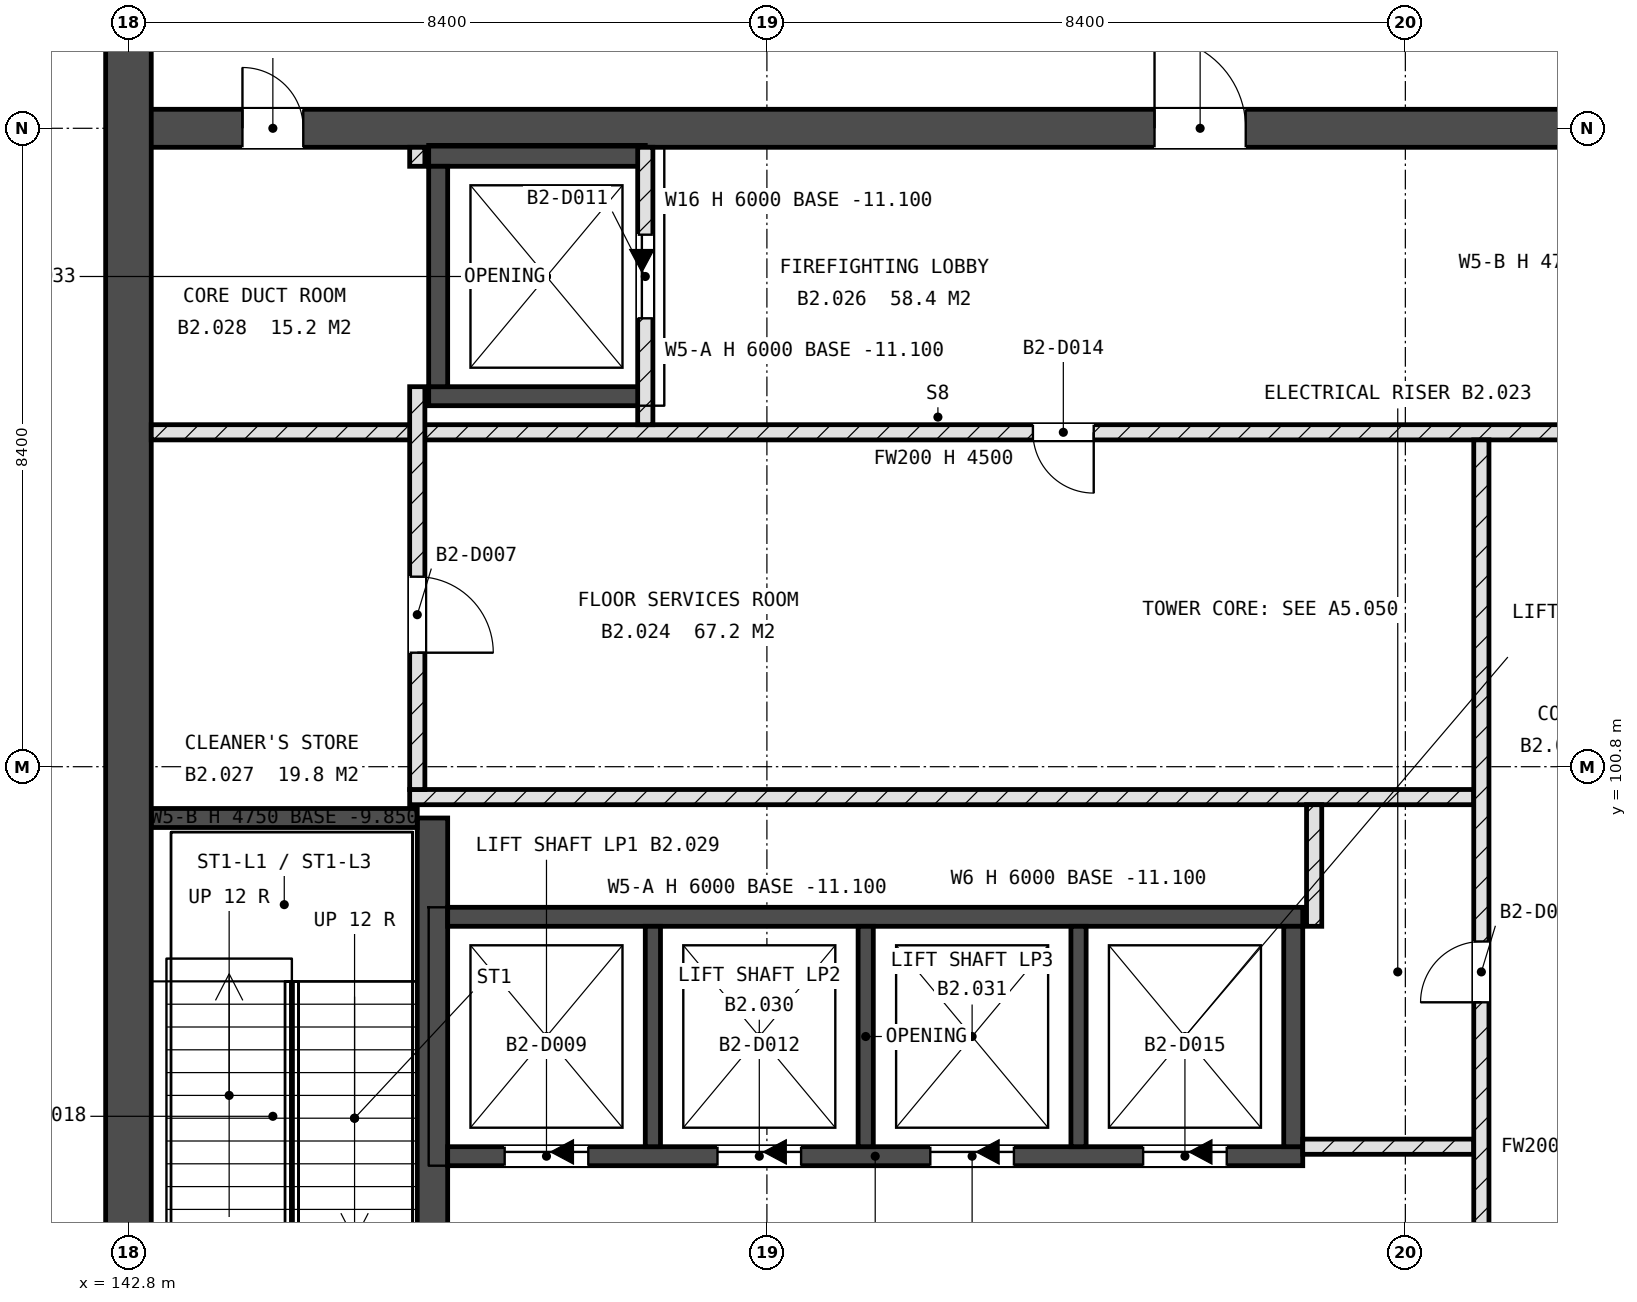
"""IFC4 building model, lengths in metres.
Left out: names, types, materials, properties, quantities, classifications, styles, units other than length and angle.
Written with IfcOpenShell. Run it as: python <this file> out.ifc"""

import sys

from ifc_helpers import new_model, si_unit, direction, frame, frame_2d, origin, place, context, subcontext, project, spatial, rectangle, extrude, element, fill, save


model = new_model("IFC4")
c1 = context("Model", 3, precision=1e-05, world=origin(), true_north=direction((0.0, 1.0)))
c2 = subcontext(c1, "Body", "Model", "MODEL_VIEW")
j1 = project(units=[si_unit("LENGTHUNIT", "METRE"), si_unit("PLANEANGLEUNIT", "RADIAN")], contexts=[c1])
p1 = place(None, origin())
s1 = spatial("IfcSite", under=j1, at=p1, CompositionType="ELEMENT")
p2 = place(p1, origin())
s2 = spatial("IfcBuilding", under=s1, at=p2, CompositionType="ELEMENT")
p3 = place(p2, frame((0.0, 0.0, -9.6)))
s3 = spatial("IfcBuildingStorey", under=s2, at=p3, CompositionType="ELEMENT", Elevation=-9.6)
p4 = place(p3, frame((142.8, 109.2, -0.25), z_axis=(0.0, 0.0, 1.0), x_axis=(1.0, 0.0, 0.0)))
e1 = element("IfcWall", 1, at=p4, inside=s3, PredefinedType="SHEAR", context=c2, shape_type="SweptSolid", body=[
    extrude(rectangle(XDim=25.2, YDim=0.5, at=frame_2d((12.6, 0.0))), origin(), (0.0, 0.0, 1.0), 4.75),
])
p5 = place(p4, frame((13.5, 0.0, 0.25)))
e2 = element("IfcOpeningElement", 2, at=p5, cuts=e1, PredefinedType="OPENING", context=c2, shape_type="SweptSolid", body=[
    extrude(rectangle(XDim=1.2, YDim=2.4, at=frame_2d((0.6, 1.2))), frame((0.0, 0.26, 0.0), z_axis=(0.0, -1.0, 0.0), x_axis=(1.0, 0.0, 0.0)), (0.0, 0.0, 1.0), 0.52),
])
p6 = place(p4, frame((1.5, 0.0, 0.25)))
e3 = element("IfcOpeningElement", 3, at=p6, cuts=e1, PredefinedType="OPENING", context=c2, shape_type="SweptSolid", body=[
    extrude(rectangle(XDim=0.8, YDim=2.1, at=frame_2d((0.4, 1.05))), frame((0.0, 0.26, 0.0), z_axis=(0.0, -1.0, 0.0), x_axis=(1.0, 0.0, 0.0)), (0.0, 0.0, 1.0), 0.52),
])
p7 = place(p3, frame((146.8, 92.65, -0.25), z_axis=(0.0, 0.0, 1.0), x_axis=(0.0, 1.0, 0.0)))
e4 = element("IfcWall", 4, at=p7, inside=s3, PredefinedType="SHEAR", context=c2, shape_type="SweptSolid", body=[
    extrude(rectangle(XDim=7.475, YDim=0.4, at=frame_2d((3.738, 0.0))), origin(), (0.0, 0.0, 1.0), 4.75),
])
p8 = place(p7, frame((0.1, 0.0, 0.25)))
e5 = element("IfcOpeningElement", 5, at=p8, cuts=e4, PredefinedType="OPENING", context=c2, shape_type="SweptSolid", body=[
    extrude(rectangle(XDim=1.0, YDim=2.1, at=frame_2d((0.5, 1.05))), frame((0.0, 0.21, 0.0), z_axis=(0.0, -1.0, 0.0), x_axis=(1.0, 0.0, 0.0)), (0.0, 0.0, 1.0), 0.42),
])
p9 = place(p3, frame((143.1, 100.125, -0.25), z_axis=(0.0, 0.0, 1.0), x_axis=(1.0, 0.0, 0.0)))
e6 = element("IfcWall", 6, at=p9, inside=s3, PredefinedType="SHEAR", context=c2, shape_type="SweptSolid", body=[
    extrude(rectangle(XDim=3.5, YDim=0.25, at=frame_2d((1.75, 0.0))), origin(), (0.0, 0.0, 1.0), 4.75),
])
p10 = place(p3, frame((147.0, 95.675, -1.5), z_axis=(0.0, 0.0, 1.0), x_axis=(1.0, 0.0, 0.0)))
e7 = element("IfcWall", 7, at=p10, inside=s3, PredefinedType="SHEAR", context=c2, shape_type="SweptSolid", body=[
    extrude(rectangle(XDim=11.25, YDim=0.25, at=frame_2d((5.625, 0.0))), origin(), (0.0, 0.0, 1.0), 6.0),
])
p11 = place(p10, frame((0.75, 0.0, 1.5)))
e8 = element("IfcOpeningElement", 8, at=p11, cuts=e7, PredefinedType="OPENING", context=c2, shape_type="SweptSolid", body=[
    extrude(rectangle(XDim=1.1, YDim=2.1, at=frame_2d((0.55, 1.05))), frame((0.0, 0.135, 0.0), z_axis=(0.0, -1.0, 0.0), x_axis=(1.0, 0.0, 0.0)), (0.0, 0.0, 1.0), 0.27),
])
p12 = place(p10, frame((3.55, 0.0, 1.5)))
e9 = element("IfcOpeningElement", 9, at=p12, cuts=e7, PredefinedType="OPENING", context=c2, shape_type="SweptSolid", body=[
    extrude(rectangle(XDim=1.1, YDim=2.1, at=frame_2d((0.55, 1.05))), frame((0.0, 0.135, 0.0), z_axis=(0.0, -1.0, 0.0), x_axis=(1.0, 0.0, 0.0)), (0.0, 0.0, 1.0), 0.27),
])
p13 = place(p10, frame((6.35, 0.0, 1.5)))
e10 = element("IfcOpeningElement", 10, at=p13, cuts=e7, PredefinedType="OPENING", context=c2, shape_type="SweptSolid", body=[
    extrude(rectangle(XDim=1.1, YDim=2.1, at=frame_2d((0.55, 1.05))), frame((0.0, 0.135, 0.0), z_axis=(0.0, -1.0, 0.0), x_axis=(1.0, 0.0, 0.0)), (0.0, 0.0, 1.0), 0.27),
])
p14 = place(p10, frame((9.15, 0.0, 1.5)))
e11 = element("IfcOpeningElement", 11, at=p14, cuts=e7, PredefinedType="OPENING", context=c2, shape_type="SweptSolid", body=[
    extrude(rectangle(XDim=1.1, YDim=2.1, at=frame_2d((0.55, 1.05))), frame((0.0, 0.135, 0.0), z_axis=(0.0, -1.0, 0.0), x_axis=(1.0, 0.0, 0.0)), (0.0, 0.0, 1.0), 0.27),
])
p15 = place(p3, frame((147.0, 98.825, -1.5), z_axis=(0.0, 0.0, 1.0), x_axis=(1.0, 0.0, 0.0)))
e12 = element("IfcWall", 12, at=p15, inside=s3, PredefinedType="SHEAR", context=c2, shape_type="SweptSolid", body=[
    extrude(rectangle(XDim=11.25, YDim=0.25, at=frame_2d((5.625, 0.0))), origin(), (0.0, 0.0, 1.0), 6.0),
])
p16 = place(p3, frame((158.125, 95.8, -1.5), z_axis=(0.0, 0.0, 1.0), x_axis=(0.0, 1.0, 0.0)))
e13 = element("IfcWall", 13, at=p16, inside=s3, PredefinedType="SHEAR", context=c2, shape_type="SweptSolid", body=[
    extrude(rectangle(XDim=2.9, YDim=0.25, at=frame_2d((1.45, 0.0))), origin(), (0.0, 0.0, 1.0), 6.0),
])
for number, where, z_axis, x_axis in (
    (14, (149.7, 95.8, -1.5), (0.0, 0.0, 1.0), (0.0, 1.0, 0.0)),
    (15, (152.5, 95.8, -1.5), (0.0, 0.0, 1.0), (0.0, 1.0, 0.0)),
    (16, (155.3, 95.8, -1.5), (0.0, 0.0, 1.0), (0.0, 1.0, 0.0)),
):
    element("IfcWall", number, at=place(p3, frame(where, z_axis=z_axis, x_axis=x_axis)), inside=s3, PredefinedType="SHEAR", context=c2, shape_type="SweptSolid", body=[
        extrude(rectangle(XDim=2.9, YDim=0.2, at=frame_2d((1.45, 0.0))), origin(), (0.0, 0.0, 1.0), 6.0),
    ])
p17 = place(p3, frame((146.75, 105.675, -1.5), z_axis=(0.0, 0.0, 1.0), x_axis=(1.0, 0.0, 0.0)))
e17 = element("IfcWall", 17, at=p17, inside=s3, PredefinedType="SHEAR", context=c2, shape_type="SweptSolid", body=[
    extrude(rectangle(XDim=2.85, YDim=0.25, at=frame_2d((1.425, 0.0))), origin(), (0.0, 0.0, 1.0), 6.0),
])
p18 = place(p3, frame((146.75, 108.837, -1.5), z_axis=(0.0, 0.0, 1.0), x_axis=(1.0, 0.0, 0.0)))
e18 = element("IfcWall", 18, at=p18, inside=s3, PredefinedType="SHEAR", context=c2, shape_type="SweptSolid", body=[
    extrude(rectangle(XDim=2.85, YDim=0.275, at=frame_2d((1.425, 0.0))), origin(), (0.0, 0.0, 1.0), 6.0),
])
p19 = place(p3, frame((146.875, 105.8, -1.5), z_axis=(0.0, 0.0, 1.0), x_axis=(0.0, 1.0, 0.0)))
e19 = element("IfcWall", 19, at=p19, inside=s3, PredefinedType="SHEAR", context=c2, shape_type="SweptSolid", body=[
    extrude(rectangle(XDim=2.9, YDim=0.25, at=frame_2d((1.45, 0.0))), origin(), (0.0, 0.0, 1.0), 6.0),
])
p20 = place(p3, frame((142.8, 117.9, -0.25), z_axis=(0.0, 0.0, 1.0), x_axis=(0.0, -1.0, 0.0)))
e20 = element("IfcWall", 20, at=p20, inside=s3, PredefinedType="SOLIDWALL", context=c2, shape_type="SweptSolid", body=[
    extrude(rectangle(XDim=34.2, YDim=0.6, at=frame_2d((17.1, 0.0))), origin(), (0.0, 0.0, 1.0), 4.75),
])
p21 = place(p3, frame((158.25, 95.8, 0.0), z_axis=(0.0, 0.0, 1.0), x_axis=(1.0, 0.0, 0.0)))
e21 = element("IfcWall", 21, at=p21, inside=s3, PredefinedType="SOLIDWALL", context=c2, shape_type="SweptSolid", body=[
    extrude(rectangle(XDim=2.25, YDim=0.2, at=frame_2d((1.125, 0.0))), origin(), (0.0, 0.0, 1.0), 4.5),
])
p22 = place(p3, frame((146.5, 100.4, 0.0), z_axis=(0.0, 0.0, 1.0), x_axis=(1.0, 0.0, 0.0)))
e22 = element("IfcWall", 22, at=p22, inside=s3, PredefinedType="SOLIDWALL", context=c2, shape_type="SweptSolid", body=[
    extrude(rectangle(XDim=14.0, YDim=0.2, at=frame_2d((7.0, 0.0))), origin(), (0.0, 0.0, 1.0), 4.5),
])
p23 = place(p3, frame((143.1, 105.2, 0.0), z_axis=(0.0, 0.0, 1.0), x_axis=(1.0, 0.0, 0.0)))
e23 = element("IfcWall", 23, at=p23, inside=s3, PredefinedType="SOLIDWALL", context=c2, shape_type="SweptSolid", body=[
    extrude(rectangle(XDim=20.85, YDim=0.2, at=frame_2d((10.425, 0.0))), origin(), (0.0, 0.0, 1.0), 4.5),
])
p24 = place(p23, frame((11.6, 0.0, 0.0)))
e24 = element("IfcOpeningElement", 24, at=p24, cuts=e23, PredefinedType="OPENING", context=c2, shape_type="SweptSolid", body=[
    extrude(rectangle(XDim=0.8, YDim=2.1, at=frame_2d((0.4, 1.05))), frame((0.0, 0.11, 0.0), z_axis=(0.0, -1.0, 0.0), x_axis=(1.0, 0.0, 0.0)), (0.0, 0.0, 1.0), 0.22),
])
p25 = place(p23, frame((18.8, 0.0, 0.0)))
e25 = element("IfcOpeningElement", 25, at=p25, cuts=e23, PredefinedType="OPENING", context=c2, shape_type="SweptSolid", body=[
    extrude(rectangle(XDim=1.0, YDim=2.1, at=frame_2d((0.5, 1.05))), frame((0.0, 0.11, 0.0), z_axis=(0.0, -1.0, 0.0), x_axis=(1.0, 0.0, 0.0)), (0.0, 0.0, 1.0), 0.22),
])
p26 = place(p3, frame((146.6, 100.5, 0.0), z_axis=(0.0, 0.0, 1.0), x_axis=(0.0, 1.0, 0.0)))
e26 = element("IfcWall", 26, at=p26, inside=s3, PredefinedType="SOLIDWALL", context=c2, shape_type="SweptSolid", body=[
    extrude(rectangle(XDim=5.3, YDim=0.2, at=frame_2d((2.65, 0.0))), origin(), (0.0, 0.0, 1.0), 4.5),
])
p27 = place(p26, frame((1.8, 0.0, 0.0)))
e27 = element("IfcOpeningElement", 27, at=p27, cuts=e26, PredefinedType="OPENING", context=c2, shape_type="SweptSolid", body=[
    extrude(rectangle(XDim=1.0, YDim=2.1, at=frame_2d((0.5, 1.05))), frame((0.0, 0.11, 0.0), z_axis=(0.0, -1.0, 0.0), x_axis=(1.0, 0.0, 0.0)), (0.0, 0.0, 1.0), 0.22),
])
p28 = place(p3, frame((146.6, 108.7, 0.0), z_axis=(0.0, 0.0, 1.0), x_axis=(0.0, 1.0, 0.0)))
e28 = element("IfcWall", 28, at=p28, inside=s3, PredefinedType="SOLIDWALL", context=c2, shape_type="SweptSolid", body=[
    extrude(rectangle(XDim=0.25, YDim=0.2, at=frame_2d((0.125, 0.0))), origin(), (0.0, 0.0, 1.0), 4.5),
])
p29 = place(p3, frame((149.6, 105.3, 0.0), z_axis=(0.0, 0.0, 1.0), x_axis=(0.0, 1.0, 0.0)))
e29 = element("IfcWall", 29, at=p29, inside=s3, PredefinedType="SOLIDWALL", context=c2, shape_type="SweptSolid", body=[
    extrude(rectangle(XDim=3.65, YDim=0.2, at=frame_2d((1.825, 0.0))), origin(), (0.0, 0.0, 1.0), 4.5),
])
p30 = place(p29, frame((1.4, 0.0, 0.0)))
e30 = element("IfcOpeningElement", 30, at=p30, cuts=e29, PredefinedType="OPENING", context=c2, shape_type="SweptSolid", body=[
    extrude(rectangle(XDim=1.1, YDim=2.1, at=frame_2d((0.55, 1.05))), frame((0.0, 0.11, 0.0), z_axis=(0.0, -1.0, 0.0), x_axis=(1.0, 0.0, 0.0)), (0.0, 0.0, 1.0), 0.22),
])
p31 = place(p3, frame((158.4, 98.7, 0.0), z_axis=(0.0, 0.0, 1.0), x_axis=(0.0, 1.0, 0.0)))
e31 = element("IfcWall", 31, at=p31, inside=s3, PredefinedType="SOLIDWALL", context=c2, shape_type="SweptSolid", body=[
    extrude(rectangle(XDim=1.6, YDim=0.2, at=frame_2d((0.8, 0.0))), origin(), (0.0, 0.0, 1.0), 4.5),
])
p32 = place(p3, frame((160.6, 92.65, 0.0), z_axis=(0.0, 0.0, 1.0), x_axis=(0.0, 1.0, 0.0)))
e32 = element("IfcWall", 32, at=p32, inside=s3, PredefinedType="SOLIDWALL", context=c2, shape_type="SweptSolid", body=[
    extrude(rectangle(XDim=12.45, YDim=0.2, at=frame_2d((6.225, 0.0))), origin(), (0.0, 0.0, 1.0), 4.5),
])
p33 = place(p32, frame((5.05, 0.0, 0.0)))
e33 = element("IfcOpeningElement", 33, at=p33, cuts=e32, PredefinedType="OPENING", context=c2, shape_type="SweptSolid", body=[
    extrude(rectangle(XDim=0.8, YDim=2.1, at=frame_2d((0.4, 1.05))), frame((0.0, 0.11, 0.0), z_axis=(0.0, -1.0, 0.0), x_axis=(1.0, 0.0, 0.0)), (0.0, 0.0, 1.0), 0.22),
])
p34 = place(p32, frame((0.75, 0.0, 0.0)))
e34 = element("IfcOpeningElement", 34, at=p34, cuts=e32, PredefinedType="OPENING", context=c2, shape_type="SweptSolid", body=[
    extrude(rectangle(XDim=1.0, YDim=2.1, at=frame_2d((0.5, 1.05))), frame((0.0, 0.11, 0.0), z_axis=(0.0, -1.0, 0.0), x_axis=(1.0, 0.0, 0.0)), (0.0, 0.0, 1.0), 0.22),
])
p35 = place(p11, origin())
e35 = element("IfcDoor", 35, at=p35, inside=s3, OperationType="SLIDING_TO_LEFT", PredefinedType="DOOR", context=c2, shape_type="SweptSolid", body=[
    extrude(rectangle(XDim=1.1, YDim=2.1, at=frame_2d((0.55, 1.05))), frame((0.0, 0.025, 0.0), z_axis=(0.0, -1.0, 0.0), x_axis=(1.0, 0.0, 0.0)), (0.0, 0.0, 1.0), 0.05),
])
fill(e8, e35)
p36 = place(p12, origin())
e36 = element("IfcDoor", 36, at=p36, inside=s3, OperationType="SLIDING_TO_LEFT", PredefinedType="DOOR", context=c2, shape_type="SweptSolid", body=[
    extrude(rectangle(XDim=1.1, YDim=2.1, at=frame_2d((0.55, 1.05))), frame((0.0, 0.025, 0.0), z_axis=(0.0, -1.0, 0.0), x_axis=(1.0, 0.0, 0.0)), (0.0, 0.0, 1.0), 0.05),
])
fill(e9, e36)
p37 = place(p13, origin())
e37 = element("IfcDoor", 37, at=p37, inside=s3, OperationType="SLIDING_TO_LEFT", PredefinedType="DOOR", context=c2, shape_type="SweptSolid", body=[
    extrude(rectangle(XDim=1.1, YDim=2.1, at=frame_2d((0.55, 1.05))), frame((0.0, 0.025, 0.0), z_axis=(0.0, -1.0, 0.0), x_axis=(1.0, 0.0, 0.0)), (0.0, 0.0, 1.0), 0.05),
])
fill(e10, e37)
p38 = place(p14, origin())
e38 = element("IfcDoor", 38, at=p38, inside=s3, OperationType="SLIDING_TO_LEFT", PredefinedType="DOOR", context=c2, shape_type="SweptSolid", body=[
    extrude(rectangle(XDim=1.1, YDim=2.1, at=frame_2d((0.55, 1.05))), frame((0.0, 0.025, 0.0), z_axis=(0.0, -1.0, 0.0), x_axis=(1.0, 0.0, 0.0)), (0.0, 0.0, 1.0), 0.05),
])
fill(e11, e38)
p39 = place(p30, origin())
e39 = element("IfcDoor", 39, at=p39, inside=s3, OperationType="SLIDING_TO_LEFT", PredefinedType="DOOR", context=c2, shape_type="SweptSolid", body=[
    extrude(rectangle(XDim=1.1, YDim=2.1, at=frame_2d((0.55, 1.05))), frame((0.0, 0.025, 0.0), z_axis=(0.0, -1.0, 0.0), x_axis=(1.0, 0.0, 0.0)), (0.0, 0.0, 1.0), 0.05),
])
fill(e30, e39)
p40 = place(p5, origin())
e40 = element("IfcDoor", 40, at=p40, inside=s3, OperationType="SINGLE_SWING_RIGHT", PredefinedType="DOOR", context=c2, shape_type="SweptSolid", body=[
    extrude(rectangle(XDim=1.2, YDim=2.4, at=frame_2d((0.6, 1.2))), frame((0.0, 0.025, 0.0), z_axis=(0.0, -1.0, 0.0), x_axis=(1.0, 0.0, 0.0)), (0.0, 0.0, 1.0), 0.05),
])
fill(e2, e40)
p41 = place(p33, origin())
e41 = element("IfcDoor", 41, at=p41, inside=s3, OperationType="SINGLE_SWING_RIGHT", PredefinedType="DOOR", context=c2, shape_type="SweptSolid", body=[
    extrude(rectangle(XDim=0.8, YDim=2.1, at=frame_2d((0.4, 1.05))), frame((0.0, 0.025, 0.0), z_axis=(0.0, -1.0, 0.0), x_axis=(1.0, 0.0, 0.0)), (0.0, 0.0, 1.0), 0.05),
])
fill(e33, e41)
p42 = place(p24, origin())
e42 = element("IfcDoor", 42, at=p42, inside=s3, OperationType="SINGLE_SWING_RIGHT", PredefinedType="DOOR", context=c2, shape_type="SweptSolid", body=[
    extrude(rectangle(XDim=0.8, YDim=2.1, at=frame_2d((0.4, 1.05))), frame((0.0, 0.025, 0.0), z_axis=(0.0, -1.0, 0.0), x_axis=(1.0, 0.0, 0.0)), (0.0, 0.0, 1.0), 0.05),
])
fill(e24, e42)
p43 = place(p27, origin())
e43 = element("IfcDoor", 43, at=p43, inside=s3, OperationType="SINGLE_SWING_LEFT", PredefinedType="DOOR", context=c2, shape_type="SweptSolid", body=[
    extrude(rectangle(XDim=1.0, YDim=2.1, at=frame_2d((0.5, 1.05))), frame((0.0, 0.025, 0.0), z_axis=(0.0, -1.0, 0.0), x_axis=(1.0, 0.0, 0.0)), (0.0, 0.0, 1.0), 0.05),
])
fill(e27, e43)
p44 = place(p6, origin())
e44 = element("IfcDoor", 44, at=p44, inside=s3, OperationType="SINGLE_SWING_RIGHT", PredefinedType="DOOR", context=c2, shape_type="SweptSolid", body=[
    extrude(rectangle(XDim=0.8, YDim=2.1, at=frame_2d((0.4, 1.05))), frame((0.0, 0.025, 0.0), z_axis=(0.0, -1.0, 0.0), x_axis=(1.0, 0.0, 0.0)), (0.0, 0.0, 1.0), 0.05),
])
fill(e3, e44)
save(model, sys.argv[1])
